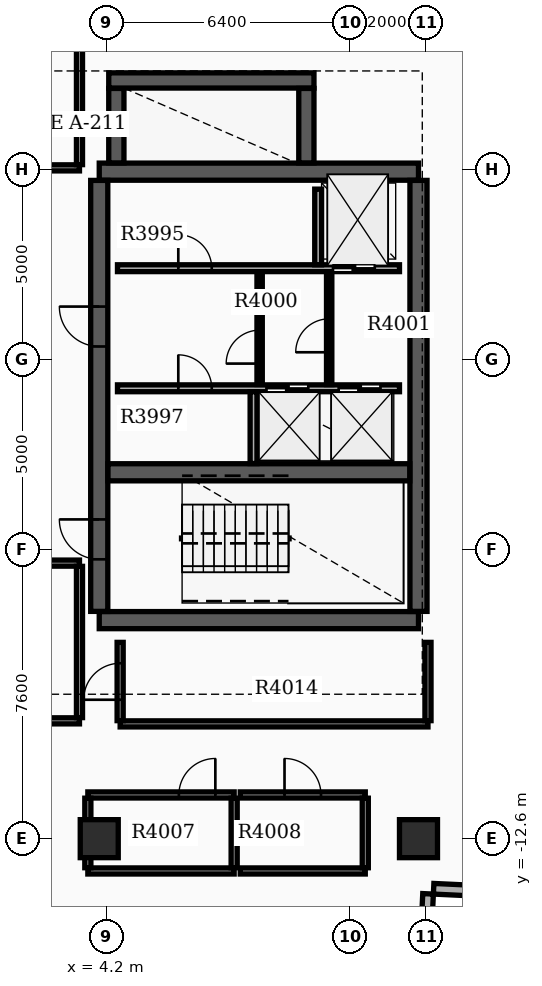
"""IFC4 building model, lengths in metres.
Left out: names, types, materials, properties, quantities, classifications, styles, units other than length and angle.
Written with IfcOpenShell. Run it as: python <this file> out.ifc"""

import sys

from ifc_helpers import new_model, si_unit, direction, frame, frame_2d, origin, origin_2d, place, context, subcontext, project, spatial, rectangle, extrude, element, fill, save


model = new_model("IFC4")
c1 = context("Model", 3, precision=1e-05, world=origin(), true_north=direction((0.0, 1.0)))
c2 = subcontext(c1, "Body", "Model", "MODEL_VIEW")
j1 = project(units=[si_unit("LENGTHUNIT", "METRE"), si_unit("PLANEANGLEUNIT", "RADIAN")], contexts=[c1])
p1 = place(None, origin())
s1 = spatial("IfcSite", under=j1, at=p1, CompositionType="ELEMENT")
p2 = place(p1, origin())
s2 = spatial("IfcBuilding", under=s1, at=p2, CompositionType="ELEMENT")
p3 = place(p2, frame((0.0, 0.0, 253.8)))
s3 = spatial("IfcBuildingStorey", under=s2, at=p3, CompositionType="ELEMENT", Elevation=253.8)
for number, where, z_axis, x_axis in (
    (1, (4.0, -6.85, 0.0), (0.0, 0.0, 1.0), (1.0, 0.0, 0.0)),
    (2, (4.0, 4.95, 0.0), (0.0, 0.0, 1.0), (1.0, 0.0, 0.0)),
):
    element("IfcWall", number, at=place(p3, frame(where, z_axis=z_axis, x_axis=x_axis)), inside=s3, PredefinedType="SHEAR", context=c2, shape_type="SweptSolid", body=[
        extrude(rectangle(XDim=8.4, YDim=0.45, at=frame_2d((4.2, 0.0))), origin(), (0.0, 0.0, 1.0), 3.7),
    ])
p4 = place(p3, frame((4.0, -6.62, 0.0), z_axis=(0.0, 0.0, 1.0), x_axis=(0.0, 1.0, 0.0)))
e3 = element("IfcWall", 3, at=p4, inside=s3, PredefinedType="SHEAR", context=c2, shape_type="SweptSolid", body=[
    extrude(rectangle(XDim=11.34, YDim=0.45, at=frame_2d((5.67, 0.0))), origin(), (0.0, 0.0, 1.0), 3.7),
])
p5 = place(p4, frame((1.37, 0.0, 0.0)))
e4 = element("IfcOpeningElement", 4, at=p5, cuts=e3, PredefinedType="OPENING", context=c2, shape_type="SweptSolid", body=[
    extrude(rectangle(XDim=1.05, YDim=2.15, at=frame_2d((0.525, 1.075))), frame((0.0, 0.235, 0.0), z_axis=(0.0, -1.0, 0.0), x_axis=(1.0, 0.0, 0.0)), (0.0, 0.0, 1.0), 0.47),
])
p6 = place(p4, frame((6.97, 0.0, 0.0)))
e5 = element("IfcOpeningElement", 5, at=p6, cuts=e3, PredefinedType="OPENING", context=c2, shape_type="SweptSolid", body=[
    extrude(rectangle(XDim=1.05, YDim=2.15, at=frame_2d((0.525, 1.075))), frame((0.0, 0.235, 0.0), z_axis=(0.0, -1.0, 0.0), x_axis=(1.0, 0.0, 0.0)), (0.0, 0.0, 1.0), 0.47),
])
p7 = place(p3, frame((12.4, -6.62, 0.0), z_axis=(0.0, 0.0, 1.0), x_axis=(0.0, 1.0, 0.0)))
e6 = element("IfcWall", 6, at=p7, inside=s3, PredefinedType="SHEAR", context=c2, shape_type="SweptSolid", body=[
    extrude(rectangle(XDim=11.34, YDim=0.45, at=frame_2d((5.67, 0.0))), origin(), (0.0, 0.0, 1.0), 3.7),
])
p8 = place(p3, frame((4.23, -2.96, 0.0), z_axis=(0.0, 0.0, 1.0), x_axis=(1.0, 0.0, 0.0)))
e7 = element("IfcWall", 7, at=p8, inside=s3, PredefinedType="SHEAR", context=c2, shape_type="SweptSolid", body=[
    extrude(rectangle(XDim=7.94, YDim=0.45, at=frame_2d((3.97, 0.0))), origin(), (0.0, 0.0, 1.0), 3.7),
])
p9 = place(p3, frame((4.45, 5.18, 0.0), z_axis=(0.0, 0.0, 1.0), x_axis=(0.0, 1.0, 0.0)))
e8 = element("IfcWall", 8, at=p9, inside=s3, PredefinedType="SHEAR", context=c2, shape_type="SweptSolid", body=[
    extrude(rectangle(XDim=1.96, YDim=0.4, at=frame_2d((0.98, 0.0))), origin(), (0.0, 0.0, 1.0), 3.7),
])
p10 = place(p3, frame((4.25, 7.35, 0.0), z_axis=(0.0, 0.0, 1.0), x_axis=(1.0, 0.0, 0.0)))
e9 = element("IfcWall", 9, at=p10, inside=s3, PredefinedType="SHEAR", context=c2, shape_type="SweptSolid", body=[
    extrude(rectangle(XDim=5.4, YDim=0.4, at=frame_2d((2.7, 0.0))), origin(), (0.0, 0.0, 1.0), 3.7),
])
p11 = place(p3, frame((9.45, 5.18, 0.0), z_axis=(0.0, 0.0, 1.0), x_axis=(0.0, 1.0, 0.0)))
e10 = element("IfcWall", 10, at=p11, inside=s3, PredefinedType="SHEAR", context=c2, shape_type="SweptSolid", body=[
    extrude(rectangle(XDim=1.96, YDim=0.4, at=frame_2d((0.98, 0.0))), origin(), (0.0, 0.0, 1.0), 3.7),
])
for number, where, z_axis, x_axis in (
    (11, (12.4, -12.6, 0.0), (0.0, 0.0, 1.0), (1.0, 0.0, 0.0)),
    (12, (4.0, -12.6, 0.0), (0.0, 0.0, 1.0), (1.0, 0.0, 0.0)),
):
    element("IfcColumn", number, at=place(p3, frame(where, z_axis=z_axis, x_axis=x_axis)), inside=s3, PredefinedType="COLUMN", context=c2, shape_type="SweptSolid", body=[
        extrude(rectangle(XDim=1.0, YDim=1.0, at=origin_2d()), origin(), (0.0, 0.0, 1.0), 3.9),
    ])
p12 = place(p3, frame((14.017, -13.976, 0.0), z_axis=(0.0, 0.0, 1.0), x_axis=(-0.998883930236, 0.047232339719, 0.0)))
e13 = element("IfcWall", 13, at=p12, inside=s3, PredefinedType="STANDARD", context=c2, shape_type="SweptSolid", body=[
    extrude(rectangle(XDim=1.22, YDim=0.28, at=frame_2d((0.61, 0.0))), origin(), (0.0, 0.0, 1.0), 3.18),
])
p13 = place(p3, frame((12.652, -14.052, 0.0), z_axis=(0.0, 0.0, 1.0), x_axis=(-0.047039284441, -0.99889304018, 0.0)))
e14 = element("IfcWall", 14, at=p13, inside=s3, PredefinedType="STANDARD", context=c2, shape_type="SweptSolid", body=[
    extrude(rectangle(XDim=1.5, YDim=0.28, at=frame_2d((0.75, 0.0))), origin(), (0.0, 0.0, 1.0), 3.18),
])
p14 = place(p3, frame((4.48, 2.41, 0.0), z_axis=(0.0, 0.0, 1.0), x_axis=(1.0, 0.0, 0.0)))
e15 = element("IfcWall", 15, at=p14, inside=s3, PredefinedType="SOLIDWALL", context=c2, shape_type="SweptSolid", body=[
    extrude(rectangle(XDim=7.42, YDim=0.18, at=frame_2d((3.71, 0.0))), origin(), (0.0, 0.0, 1.0), 3.17),
])
p15 = place(p14, frame((5.67, 0.0, 0.0)))
e16 = element("IfcOpeningElement", 16, at=p15, cuts=e15, PredefinedType="OPENING", context=c2, shape_type="SweptSolid", body=[
    extrude(rectangle(XDim=1.1, YDim=2.15, at=frame_2d((0.55, 1.075))), frame((0.0, 0.1, 0.0), z_axis=(0.0, -1.0, 0.0), x_axis=(1.0, 0.0, 0.0)), (0.0, 0.0, 1.0), 0.2),
])
p16 = place(p14, frame((1.6, 0.0, 0.0)))
e17 = element("IfcOpeningElement", 17, at=p16, cuts=e15, PredefinedType="OPENING", context=c2, shape_type="SweptSolid", body=[
    extrude(rectangle(XDim=0.88, YDim=2.1, at=frame_2d((0.44, 1.05))), frame((0.0, 0.1, 0.0), z_axis=(0.0, -1.0, 0.0), x_axis=(1.0, 0.0, 0.0)), (0.0, 0.0, 1.0), 0.2),
])
p17 = place(p3, frame((4.48, -0.75, 0.0), z_axis=(0.0, 0.0, 1.0), x_axis=(1.0, 0.0, 0.0)))
e18 = element("IfcWall", 18, at=p17, inside=s3, PredefinedType="SOLIDWALL", context=c2, shape_type="SweptSolid", body=[
    extrude(rectangle(XDim=7.42, YDim=0.18, at=frame_2d((3.71, 0.0))), origin(), (0.0, 0.0, 1.0), 3.17),
])
p18 = place(p17, frame((3.92, 0.0, 0.0)))
e19 = element("IfcOpeningElement", 19, at=p18, cuts=e18, PredefinedType="OPENING", context=c2, shape_type="SweptSolid", body=[
    extrude(rectangle(XDim=1.1, YDim=2.15, at=frame_2d((0.55, 1.075))), frame((0.0, 0.1, 0.0), z_axis=(0.0, -1.0, 0.0), x_axis=(1.0, 0.0, 0.0)), (0.0, 0.0, 1.0), 0.2),
])
p19 = place(p17, frame((5.82, 0.0, 0.0)))
e20 = element("IfcOpeningElement", 20, at=p19, cuts=e18, PredefinedType="OPENING", context=c2, shape_type="SweptSolid", body=[
    extrude(rectangle(XDim=1.1, YDim=2.15, at=frame_2d((0.55, 1.075))), frame((0.0, 0.1, 0.0), z_axis=(0.0, -1.0, 0.0), x_axis=(1.0, 0.0, 0.0)), (0.0, 0.0, 1.0), 0.2),
])
p20 = place(p17, frame((1.6, 0.0, 0.0)))
e21 = element("IfcOpeningElement", 21, at=p20, cuts=e18, PredefinedType="OPENING", context=c2, shape_type="SweptSolid", body=[
    extrude(rectangle(XDim=0.88, YDim=2.1, at=frame_2d((0.44, 1.05))), frame((0.0, 0.1, 0.0), z_axis=(0.0, -1.0, 0.0), x_axis=(1.0, 0.0, 0.0)), (0.0, 0.0, 1.0), 0.2),
])
p21 = place(p3, frame((9.76, 2.5, 0.0), z_axis=(0.0, 0.0, 1.0), x_axis=(0.0, 1.0, 0.0)))
e22 = element("IfcWall", 22, at=p21, inside=s3, PredefinedType="SOLIDWALL", context=c2, shape_type="SweptSolid", body=[
    extrude(rectangle(XDim=1.99, YDim=0.18, at=frame_2d((0.995, 0.0))), origin(), (0.0, 0.0, 1.0), 3.17),
])
p22 = place(p3, frame((8.06, -2.73, 0.0), z_axis=(0.0, 0.0, 1.0), x_axis=(0.0, 1.0, 0.0)))
e23 = element("IfcWall", 23, at=p22, inside=s3, PredefinedType="SOLIDWALL", context=c2, shape_type="SweptSolid", body=[
    extrude(rectangle(XDim=1.89, YDim=0.18, at=frame_2d((0.945, 0.0))), origin(), (0.0, 0.0, 1.0), 3.17),
])
p23 = place(p3, frame((8.22, -0.65, 0.0), z_axis=(0.0, 0.0, 1.0), x_axis=(0.0, 1.0, 0.0)))
e24 = element("IfcWall", 24, at=p23, inside=s3, PredefinedType="SOLIDWALL", context=c2, shape_type="SweptSolid", body=[
    extrude(rectangle(XDim=2.96, YDim=0.14, at=frame_2d((1.48, 0.0))), origin(), (0.0, 0.0, 1.0), 3.17),
])
p24 = place(p23, frame((0.55, 0.0, 0.0)))
e25 = element("IfcOpeningElement", 25, at=p24, cuts=e24, PredefinedType="OPENING", context=c2, shape_type="SweptSolid", body=[
    extrude(rectangle(XDim=0.88, YDim=2.1, at=frame_2d((0.44, 1.05))), frame((0.0, 0.08, 0.0), z_axis=(0.0, -1.0, 0.0), x_axis=(1.0, 0.0, 0.0)), (0.0, 0.0, 1.0), 0.16),
])
p25 = place(p3, frame((10.05, -0.652, 0.0), z_axis=(0.0, 0.0, 1.0), x_axis=(0.0, 1.0, 0.0)))
e26 = element("IfcWall", 26, at=p25, inside=s3, PredefinedType="PARTITIONING", context=c2, shape_type="SweptSolid", body=[
    extrude(rectangle(XDim=2.962, YDim=0.14, at=frame_2d((1.481, 0.0))), origin(), (0.0, 0.0, 1.0), 3.17),
])
p26 = place(p25, frame((0.85, 0.0, 0.0)))
e27 = element("IfcOpeningElement", 27, at=p26, cuts=e26, PredefinedType="OPENING", context=c2, shape_type="SweptSolid", body=[
    extrude(rectangle(XDim=0.88, YDim=2.1, at=frame_2d((0.44, 1.05))), frame((0.0, 0.08, 0.0), z_axis=(0.0, -1.0, 0.0), x_axis=(1.0, 0.0, 0.0)), (0.0, 0.0, 1.0), 0.16),
])
p27 = place(p3, frame((3.7, -13.45, 0.0), z_axis=(0.0, 0.0, 1.0), x_axis=(1.0, 0.0, 0.0)))
e28 = element("IfcWall", 28, at=p27, inside=s3, PredefinedType="PARTITIONING", context=c2, shape_type="SweptSolid", body=[
    extrude(rectangle(XDim=3.85, YDim=0.16, at=frame_2d((1.925, 0.0))), origin(), (0.0, 0.0, 1.0), 3.17),
])
p28 = place(p3, frame((3.7, -11.45, 0.0), z_axis=(0.0, 0.0, 1.0), x_axis=(1.0, 0.0, 0.0)))
e29 = element("IfcWall", 29, at=p28, inside=s3, PredefinedType="PARTITIONING", context=c2, shape_type="SweptSolid", body=[
    extrude(rectangle(XDim=3.85, YDim=0.16, at=frame_2d((1.925, 0.0))), origin(), (0.0, 0.0, 1.0), 3.17),
])
p29 = place(p28, frame((2.395, 0.0, 0.0)))
e30 = element("IfcOpeningElement", 30, at=p29, cuts=e29, PredefinedType="OPENING", context=c2, shape_type="SweptSolid", body=[
    extrude(rectangle(XDim=0.96, YDim=2.15, at=frame_2d((0.48, 1.075))), frame((0.0, 0.09, 0.0), z_axis=(0.0, -1.0, 0.0), x_axis=(1.0, 0.0, 0.0)), (0.0, 0.0, 1.0), 0.18),
])
for number, where, z_axis, x_axis in (
    (31, (3.7, -13.365, 0.0), (0.0, 0.0, 1.0), (0.0, 1.0, 0.0)),
    (32, (7.55, -13.365, 0.0), (0.0, 0.0, 1.0), (0.0, 1.0, 0.0)),
):
    element("IfcWall", number, at=place(p3, frame(where, z_axis=z_axis, x_axis=x_axis)), inside=s3, PredefinedType="PARTITIONING", context=c2, shape_type="SweptSolid", body=[
        extrude(rectangle(XDim=1.83, YDim=0.16, at=frame_2d((0.915, 0.0))), origin(), (0.0, 0.0, 1.0), 3.17),
    ])
p30 = place(p3, frame((7.71, -13.45, 0.0), z_axis=(0.0, 0.0, 1.0), x_axis=(1.0, 0.0, 0.0)))
e33 = element("IfcWall", 33, at=p30, inside=s3, PredefinedType="PARTITIONING", context=c2, shape_type="SweptSolid", body=[
    extrude(rectangle(XDim=3.29, YDim=0.16, at=frame_2d((1.645, 0.0))), origin(), (0.0, 0.0, 1.0), 3.17),
])
p31 = place(p3, frame((7.71, -11.45, 0.0), z_axis=(0.0, 0.0, 1.0), x_axis=(1.0, 0.0, 0.0)))
e34 = element("IfcWall", 34, at=p31, inside=s3, PredefinedType="PARTITIONING", context=c2, shape_type="SweptSolid", body=[
    extrude(rectangle(XDim=3.29, YDim=0.16, at=frame_2d((1.645, 0.0))), origin(), (0.0, 0.0, 1.0), 3.17),
])
p32 = place(p31, frame((1.165, 0.0, 0.0)))
e35 = element("IfcOpeningElement", 35, at=p32, cuts=e34, PredefinedType="OPENING", context=c2, shape_type="SweptSolid", body=[
    extrude(rectangle(XDim=0.96, YDim=2.15, at=frame_2d((0.48, 1.075))), frame((0.0, 0.09, 0.0), z_axis=(0.0, -1.0, 0.0), x_axis=(1.0, 0.0, 0.0)), (0.0, 0.0, 1.0), 0.18),
])
p33 = place(p3, frame((11.0, -13.365, 0.0), z_axis=(0.0, 0.0, 1.0), x_axis=(0.0, 1.0, 0.0)))
e36 = element("IfcWall", 36, at=p33, inside=s3, PredefinedType="PARTITIONING", context=c2, shape_type="SweptSolid", body=[
    extrude(rectangle(XDim=1.83, YDim=0.16, at=frame_2d((0.915, 0.0))), origin(), (0.0, 0.0, 1.0), 3.17),
])
p34 = place(p3, frame((-1.6, 5.05, 0.0), z_axis=(0.0, 0.0, 1.0), x_axis=(1.0, 0.0, 0.0)))
e37 = element("IfcWall", 37, at=p34, inside=s3, PredefinedType="PARTITIONING", context=c2, shape_type="SweptSolid", body=[
    extrude(rectangle(XDim=5.08, YDim=0.16, at=frame_2d((2.54, 0.0))), origin(), (0.0, 0.0, 1.0), 3.17),
])
p35 = place(p34, frame((2.06, 0.0, 0.0)))
e38 = element("IfcOpeningElement", 38, at=p35, cuts=e37, PredefinedType="OPENING", context=c2, shape_type="SweptSolid", body=[
    extrude(rectangle(XDim=0.96, YDim=2.15, at=frame_2d((0.48, 1.075))), frame((0.0, 0.09, 0.0), z_axis=(0.0, -1.0, 0.0), x_axis=(1.0, 0.0, 0.0)), (0.0, 0.0, 1.0), 0.18),
])
p36 = place(p3, frame((3.48, 5.135, 0.0), z_axis=(0.0, 0.0, 1.0), x_axis=(0.0, 1.0, 0.0)))
e39 = element("IfcWall", 39, at=p36, inside=s3, PredefinedType="PARTITIONING", context=c2, shape_type="SweptSolid", body=[
    extrude(rectangle(XDim=3.76, YDim=0.16, at=frame_2d((1.88, 0.0))), origin(), (0.0, 0.0, 1.0), 3.17),
])
p37 = place(p3, frame((-1.6, -9.5, 0.0), z_axis=(0.0, 0.0, 1.0), x_axis=(1.0, 0.0, 0.0)))
e40 = element("IfcWall", 40, at=p37, inside=s3, PredefinedType="PARTITIONING", context=c2, shape_type="SweptSolid", body=[
    extrude(rectangle(XDim=5.08, YDim=0.16, at=frame_2d((2.54, 0.0))), origin(), (0.0, 0.0, 1.0), 3.17),
])
p38 = place(p3, frame((-1.6, -5.35, 0.0), z_axis=(0.0, 0.0, 1.0), x_axis=(1.0, 0.0, 0.0)))
e41 = element("IfcWall", 41, at=p38, inside=s3, PredefinedType="PARTITIONING", context=c2, shape_type="SweptSolid", body=[
    extrude(rectangle(XDim=5.08, YDim=0.16, at=frame_2d((2.54, 0.0))), origin(), (0.0, 0.0, 1.0), 3.17),
])
p39 = place(p38, frame((2.06, 0.0, 0.0)))
e42 = element("IfcOpeningElement", 42, at=p39, cuts=e41, PredefinedType="OPENING", context=c2, shape_type="SweptSolid", body=[
    extrude(rectangle(XDim=0.96, YDim=2.15, at=frame_2d((0.48, 1.075))), frame((0.0, 0.09, 0.0), z_axis=(0.0, -1.0, 0.0), x_axis=(1.0, 0.0, 0.0)), (0.0, 0.0, 1.0), 0.18),
])
p40 = place(p3, frame((3.48, -9.415, 0.0), z_axis=(0.0, 0.0, 1.0), x_axis=(0.0, 1.0, 0.0)))
e43 = element("IfcWall", 43, at=p40, inside=s3, PredefinedType="PARTITIONING", context=c2, shape_type="SweptSolid", body=[
    extrude(rectangle(XDim=3.98, YDim=0.16, at=frame_2d((1.99, 0.0))), origin(), (0.0, 0.0, 1.0), 3.17),
])
p41 = place(p3, frame((4.55, -9.58, 0.0), z_axis=(0.0, 0.0, 1.0), x_axis=(1.0, 0.0, 0.0)))
e44 = element("IfcWall", 44, at=p41, inside=s3, PredefinedType="PARTITIONING", context=c2, shape_type="SweptSolid", body=[
    extrude(rectangle(XDim=8.1, YDim=0.16, at=frame_2d((4.05, 0.0))), origin(), (0.0, 0.0, 1.0), 3.17),
])
p42 = place(p3, frame((4.55, -9.495, 0.0), z_axis=(0.0, 0.0, 1.0), x_axis=(0.0, 1.0, 0.0)))
e45 = element("IfcWall", 45, at=p42, inside=s3, PredefinedType="PARTITIONING", context=c2, shape_type="SweptSolid", body=[
    extrude(rectangle(XDim=2.06, YDim=0.16, at=frame_2d((1.03, 0.0))), origin(), (0.0, 0.0, 1.0), 3.17),
])
p43 = place(p42, frame((0.55, 0.0, 0.0)))
e46 = element("IfcOpeningElement", 46, at=p43, cuts=e45, PredefinedType="OPENING", context=c2, shape_type="SweptSolid", body=[
    extrude(rectangle(XDim=0.96, YDim=2.15, at=frame_2d((0.48, 1.075))), frame((0.0, 0.09, 0.0), z_axis=(0.0, -1.0, 0.0), x_axis=(1.0, 0.0, 0.0)), (0.0, 0.0, 1.0), 0.18),
])
p44 = place(p3, frame((12.65, -9.495, 0.0), z_axis=(0.0, 0.0, 1.0), x_axis=(0.0, 1.0, 0.0)))
e47 = element("IfcWall", 47, at=p44, inside=s3, PredefinedType="PARTITIONING", context=c2, shape_type="SweptSolid", body=[
    extrude(rectangle(XDim=2.06, YDim=0.16, at=frame_2d((1.03, 0.0))), origin(), (0.0, 0.0, 1.0), 3.17),
])
p45 = place(p5, origin())
e48 = element("IfcDoor", 48, at=p45, inside=s3, OperationType="SINGLE_SWING_RIGHT", PredefinedType="DOOR", context=c2, shape_type="SweptSolid", body=[
    extrude(rectangle(XDim=1.05, YDim=2.15, at=frame_2d((0.525, 1.075))), frame((0.0, 0.025, 0.0), z_axis=(0.0, -1.0, 0.0), x_axis=(1.0, 0.0, 0.0)), (0.0, 0.0, 1.0), 0.05),
])
fill(e4, e48)
p46 = place(p6, origin())
e49 = element("IfcDoor", 49, at=p46, inside=s3, OperationType="SINGLE_SWING_RIGHT", PredefinedType="DOOR", context=c2, shape_type="SweptSolid", body=[
    extrude(rectangle(XDim=1.05, YDim=2.15, at=frame_2d((0.525, 1.075))), frame((0.0, 0.025, 0.0), z_axis=(0.0, -1.0, 0.0), x_axis=(1.0, 0.0, 0.0)), (0.0, 0.0, 1.0), 0.05),
])
fill(e5, e49)
p47 = place(p15, origin())
e50 = element("IfcDoor", 50, at=p47, inside=s3, OperationType="DOUBLE_DOOR_SLIDING", PredefinedType="DOOR", context=c2, shape_type="SweptSolid", body=[
    extrude(rectangle(XDim=1.1, YDim=2.15, at=frame_2d((0.55, 1.075))), frame((0.0, 0.025, 0.0), z_axis=(0.0, -1.0, 0.0), x_axis=(1.0, 0.0, 0.0)), (0.0, 0.0, 1.0), 0.05),
])
fill(e16, e50)
p48 = place(p18, origin())
e51 = element("IfcDoor", 51, at=p48, inside=s3, OperationType="DOUBLE_DOOR_SLIDING", PredefinedType="DOOR", context=c2, shape_type="SweptSolid", body=[
    extrude(rectangle(XDim=1.1, YDim=2.15, at=frame_2d((0.55, 1.075))), frame((0.0, 0.025, 0.0), z_axis=(0.0, -1.0, 0.0), x_axis=(1.0, 0.0, 0.0)), (0.0, 0.0, 1.0), 0.05),
])
fill(e19, e51)
p49 = place(p19, origin())
e52 = element("IfcDoor", 52, at=p49, inside=s3, OperationType="DOUBLE_DOOR_SLIDING", PredefinedType="DOOR", context=c2, shape_type="SweptSolid", body=[
    extrude(rectangle(XDim=1.1, YDim=2.15, at=frame_2d((0.55, 1.075))), frame((0.0, 0.025, 0.0), z_axis=(0.0, -1.0, 0.0), x_axis=(1.0, 0.0, 0.0)), (0.0, 0.0, 1.0), 0.05),
])
fill(e20, e52)
p50 = place(p16, origin())
e53 = element("IfcDoor", 53, at=p50, inside=s3, OperationType="SINGLE_SWING_LEFT", PredefinedType="DOOR", context=c2, shape_type="SweptSolid", body=[
    extrude(rectangle(XDim=0.88, YDim=2.1, at=frame_2d((0.44, 1.05))), frame((0.0, 0.025, 0.0), z_axis=(0.0, -1.0, 0.0), x_axis=(1.0, 0.0, 0.0)), (0.0, 0.0, 1.0), 0.05),
])
fill(e17, e53)
p51 = place(p20, origin())
e54 = element("IfcDoor", 54, at=p51, inside=s3, OperationType="SINGLE_SWING_LEFT", PredefinedType="DOOR", context=c2, shape_type="SweptSolid", body=[
    extrude(rectangle(XDim=0.88, YDim=2.1, at=frame_2d((0.44, 1.05))), frame((0.0, 0.025, 0.0), z_axis=(0.0, -1.0, 0.0), x_axis=(1.0, 0.0, 0.0)), (0.0, 0.0, 1.0), 0.05),
])
fill(e21, e54)
p52 = place(p24, origin())
e55 = element("IfcDoor", 55, at=p52, inside=s3, OperationType="SINGLE_SWING_LEFT", PredefinedType="DOOR", context=c2, shape_type="SweptSolid", body=[
    extrude(rectangle(XDim=0.88, YDim=2.1, at=frame_2d((0.44, 1.05))), frame((0.0, 0.025, 0.0), z_axis=(0.0, -1.0, 0.0), x_axis=(1.0, 0.0, 0.0)), (0.0, 0.0, 1.0), 0.05),
])
fill(e25, e55)
p53 = place(p26, origin())
e56 = element("IfcDoor", 56, at=p53, inside=s3, OperationType="SINGLE_SWING_LEFT", PredefinedType="DOOR", context=c2, shape_type="SweptSolid", body=[
    extrude(rectangle(XDim=0.88, YDim=2.1, at=frame_2d((0.44, 1.05))), frame((0.0, 0.025, 0.0), z_axis=(0.0, -1.0, 0.0), x_axis=(1.0, 0.0, 0.0)), (0.0, 0.0, 1.0), 0.05),
])
fill(e27, e56)
p54 = place(p29, origin())
e57 = element("IfcDoor", 57, at=p54, inside=s3, OperationType="SINGLE_SWING_RIGHT", PredefinedType="DOOR", context=c2, shape_type="SweptSolid", body=[
    extrude(rectangle(XDim=0.96, YDim=2.15, at=frame_2d((0.48, 1.075))), frame((0.0, 0.025, 0.0), z_axis=(0.0, -1.0, 0.0), x_axis=(1.0, 0.0, 0.0)), (0.0, 0.0, 1.0), 0.05),
])
fill(e30, e57)
p55 = place(p32, origin())
e58 = element("IfcDoor", 58, at=p55, inside=s3, OperationType="SINGLE_SWING_LEFT", PredefinedType="DOOR", context=c2, shape_type="SweptSolid", body=[
    extrude(rectangle(XDim=0.96, YDim=2.15, at=frame_2d((0.48, 1.075))), frame((0.0, 0.025, 0.0), z_axis=(0.0, -1.0, 0.0), x_axis=(1.0, 0.0, 0.0)), (0.0, 0.0, 1.0), 0.05),
])
fill(e35, e58)
p56 = place(p43, origin())
e59 = element("IfcDoor", 59, at=p56, inside=s3, OperationType="SINGLE_SWING_LEFT", PredefinedType="DOOR", context=c2, shape_type="SweptSolid", body=[
    extrude(rectangle(XDim=0.96, YDim=2.15, at=frame_2d((0.48, 1.075))), frame((0.0, 0.025, 0.0), z_axis=(0.0, -1.0, 0.0), x_axis=(1.0, 0.0, 0.0)), (0.0, 0.0, 1.0), 0.05),
])
fill(e46, e59)
save(model, sys.argv[1])
